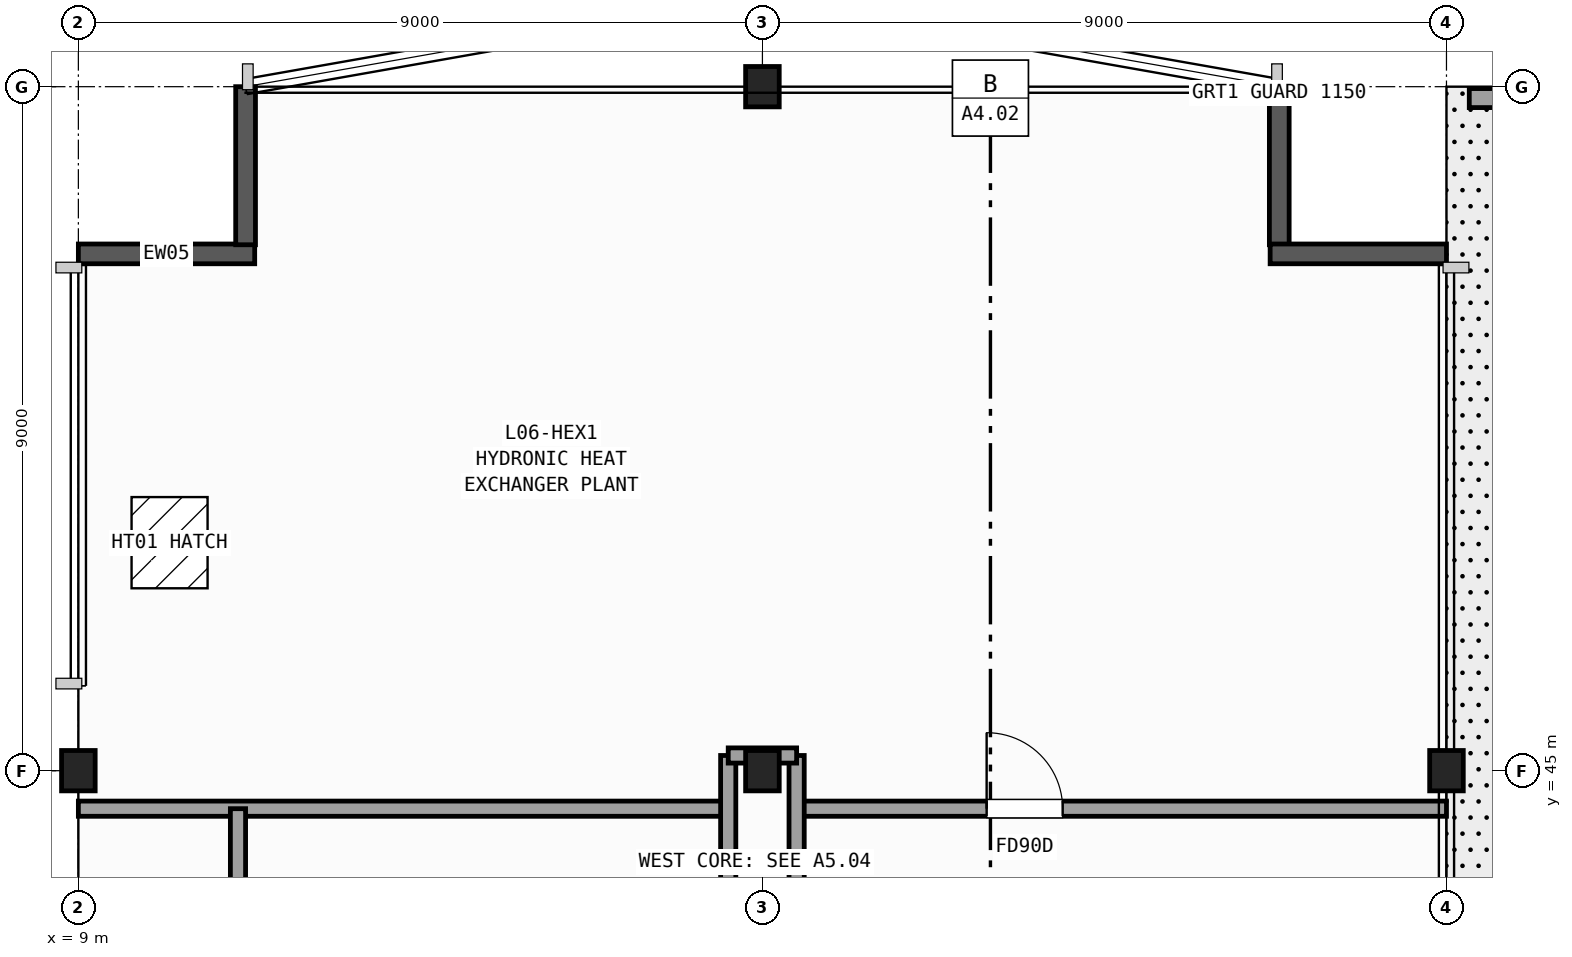
"""IFC4 building model, lengths in metres.
Left out: names, types, materials, properties, quantities, classifications, styles, units other than length and angle.
Written with IfcOpenShell. Run it as: python <this file> out.ifc"""

import sys

from ifc_helpers import new_model, si_unit, direction, frame, frame_2d, origin, origin_2d, place, context, subcontext, project, spatial, rectangle, i_section, extrude, element, fill, save


model = new_model("IFC4")
c1 = context("Model", 3, precision=1e-05, world=origin(), true_north=direction((0.0, 1.0)))
c2 = subcontext(c1, "Body", "Model", "MODEL_VIEW")
j1 = project(units=[si_unit("LENGTHUNIT", "METRE"), si_unit("PLANEANGLEUNIT", "RADIAN")], contexts=[c1])
p1 = place(None, origin())
s1 = spatial("IfcSite", under=j1, at=p1, CompositionType="ELEMENT")
p2 = place(p1, origin())
s2 = spatial("IfcBuilding", under=s1, at=p2, CompositionType="ELEMENT")
p3 = place(p2, frame((0.0, 0.0, 30.8)))
s3 = spatial("IfcBuildingStorey", under=s2, at=p3, CompositionType="ELEMENT", Elevation=30.8)
for number, where, z_axis, x_axis in (
    (1, (9.0, 45.0, 0.0), (0.0, 0.0, 1.0), (1.0, 0.0, 0.0)),
    (2, (18.0, 45.0, 0.0), (0.0, 0.0, 1.0), (1.0, 0.0, 0.0)),
    (3, (18.0, 54.0, 0.0), (0.0, 0.0, 1.0), (1.0, 0.0, 0.0)),
    (4, (27.0, 45.0, 0.0), (0.0, 0.0, 1.0), (1.0, 0.0, 0.0)),
):
    element("IfcColumn", number, at=place(p3, frame(where, z_axis=z_axis, x_axis=x_axis)), inside=s3, PredefinedType="COLUMN", context=c2, shape_type="SweptSolid", body=[
        extrude(i_section(OverallWidth=0.442, OverallDepth=0.531, WebThickness=0.066, FlangeThickness=0.106, FilletRadius=0.015, at=origin_2d()), origin(), (0.0, 0.0, 1.0), 5.2),
    ])
p4 = place(p3, frame((9.0, 51.8, 0.0), z_axis=(0.0, 0.0, 1.0), x_axis=(1.0, 0.0, 0.0)))
e5 = element("IfcWall", 5, at=p4, inside=s3, PredefinedType="SOLIDWALL", context=c2, shape_type="SweptSolid", body=[
    extrude(rectangle(XDim=2.32, YDim=0.26, at=frame_2d((1.16, 0.0))), origin(), (0.0, 0.0, 1.0), 4.92),
])
for number, where, z_axis, x_axis in (
    (6, (11.2, 51.92, 0.0), (0.0, 0.0, 1.0), (0.0, 1.0, 0.0)),
    (7, (24.8, 54.0, 0.0), (0.0, 0.0, 1.0), (0.0, -1.0, 0.0)),
):
    element("IfcWall", number, at=place(p3, frame(where, z_axis=z_axis, x_axis=x_axis)), inside=s3, PredefinedType="SOLIDWALL", context=c2, shape_type="SweptSolid", body=[
        extrude(rectangle(XDim=2.08, YDim=0.26, at=frame_2d((1.04, 0.0))), origin(), (0.0, 0.0, 1.0), 4.92),
    ])
p5 = place(p3, frame((24.68, 51.8, 0.0), z_axis=(0.0, 0.0, 1.0), x_axis=(1.0, 0.0, 0.0)))
e8 = element("IfcWall", 8, at=p5, inside=s3, PredefinedType="SOLIDWALL", context=c2, shape_type="SweptSolid", body=[
    extrude(rectangle(XDim=2.32, YDim=0.26, at=frame_2d((1.16, 0.0))), origin(), (0.0, 0.0, 1.0), 4.92),
])
p6 = place(p3, frame((27.3, 53.85, 0.0), z_axis=(0.0, 0.0, 1.0), x_axis=(1.0, 0.0, 0.0)))
e9 = element("IfcWall", 9, at=p6, inside=s3, PredefinedType="PARAPET", context=c2, shape_type="SweptSolid", body=[
    extrude(rectangle(XDim=35.45, YDim=0.25, at=frame_2d((17.725, 0.0))), origin(), (0.0, 0.0, 1.0), 1.2),
])
p7 = place(p3, frame((9.0, 44.5, 0.0), z_axis=(0.0, 0.0, 1.0), x_axis=(1.0, 0.0, 0.0)))
e10 = element("IfcWall", 10, at=p7, inside=s3, PredefinedType="PARTITIONING", context=c2, shape_type="SweptSolid", body=[
    extrude(rectangle(XDim=8.55, YDim=0.2, at=frame_2d((4.275, 0.0))), origin(), (0.0, 0.0, 1.0), 4.127),
])
p8 = place(p3, frame((18.45, 44.5, 0.0), z_axis=(0.0, 0.0, 1.0), x_axis=(1.0, 0.0, 0.0)))
e11 = element("IfcWall", 11, at=p8, inside=s3, PredefinedType="PARTITIONING", context=c2, shape_type="SweptSolid", body=[
    extrude(rectangle(XDim=8.55, YDim=0.2, at=frame_2d((4.275, 0.0))), origin(), (0.0, 0.0, 1.0), 4.127),
])
p9 = place(p8, frame((2.5, 0.0, 0.0)))
e12 = element("IfcOpeningElement", 12, at=p9, cuts=e11, PredefinedType="OPENING", context=c2, shape_type="SweptSolid", body=[
    extrude(rectangle(XDim=1.0, YDim=2.15, at=frame_2d((0.5, 1.075))), frame((0.0, 0.11, 0.0), z_axis=(0.0, -1.0, 0.0), x_axis=(1.0, 0.0, 0.0)), (0.0, 0.0, 1.0), 0.22),
])
for number, where, z_axis, x_axis in (
    (13, (17.55, 42.4, 0.0), (0.0, 0.0, 1.0), (0.0, 1.0, 0.0)),
    (14, (18.45, 42.4, 0.0), (0.0, 0.0, 1.0), (0.0, 1.0, 0.0)),
):
    element("IfcWall", number, at=place(p3, frame(where, z_axis=z_axis, x_axis=x_axis)), inside=s3, PredefinedType="PARTITIONING", context=c2, shape_type="SweptSolid", body=[
        extrude(rectangle(XDim=2.8, YDim=0.2, at=frame_2d((1.4, 0.0))), origin(), (0.0, 0.0, 1.0), 3.973),
    ])
p10 = place(p3, frame((17.55, 45.2, 0.0), z_axis=(0.0, 0.0, 1.0), x_axis=(1.0, 0.0, 0.0)))
e15 = element("IfcWall", 15, at=p10, inside=s3, PredefinedType="PARTITIONING", context=c2, shape_type="SweptSolid", body=[
    extrude(rectangle(XDim=0.9, YDim=0.2, at=frame_2d((0.45, 0.0))), origin(), (0.0, 0.0, 1.0), 3.973),
])
p11 = place(p3, frame((11.1, 42.4, 0.0), z_axis=(0.0, 0.0, 1.0), x_axis=(0.0, 1.0, 0.0)))
e16 = element("IfcWall", 16, at=p11, inside=s3, PredefinedType="PARTITIONING", context=c2, shape_type="SweptSolid", body=[
    extrude(rectangle(XDim=2.1, YDim=0.2, at=frame_2d((1.05, 0.0))), origin(), (0.0, 0.0, 1.0), 4.92),
])
p12 = place(p3, frame((0.0, 0.0, -0.36)))
p13 = place(p12, frame((10.2, 48.0, 0.0)))
p14 = place(p13, frame((0.0, 0.0, 0.31)))
e17 = element("IfcDoor", 17, at=p14, inside=s3, OperationType="SINGLE_SWING_LEFT", PredefinedType="TRAPDOOR", context=c2, shape_type="SweptSolid", body=[
    extrude(rectangle(XDim=1.0, YDim=1.2, at=origin_2d()), origin(), (0.0, 0.0, 1.0), 0.05),
])
p15 = place(p9, origin())
e18 = element("IfcDoor", 18, at=p15, inside=s3, OperationType="SINGLE_SWING_LEFT", PredefinedType="DOOR", context=c2, shape_type="SweptSolid", body=[
    extrude(rectangle(XDim=1.0, YDim=2.15, at=frame_2d((0.5, 1.075))), frame((0.0, 0.025, 0.0), z_axis=(0.0, -1.0, 0.0), x_axis=(1.0, 0.0, 0.0)), (0.0, 0.0, 1.0), 0.05),
])
fill(e12, e18)
save(model, sys.argv[1])
